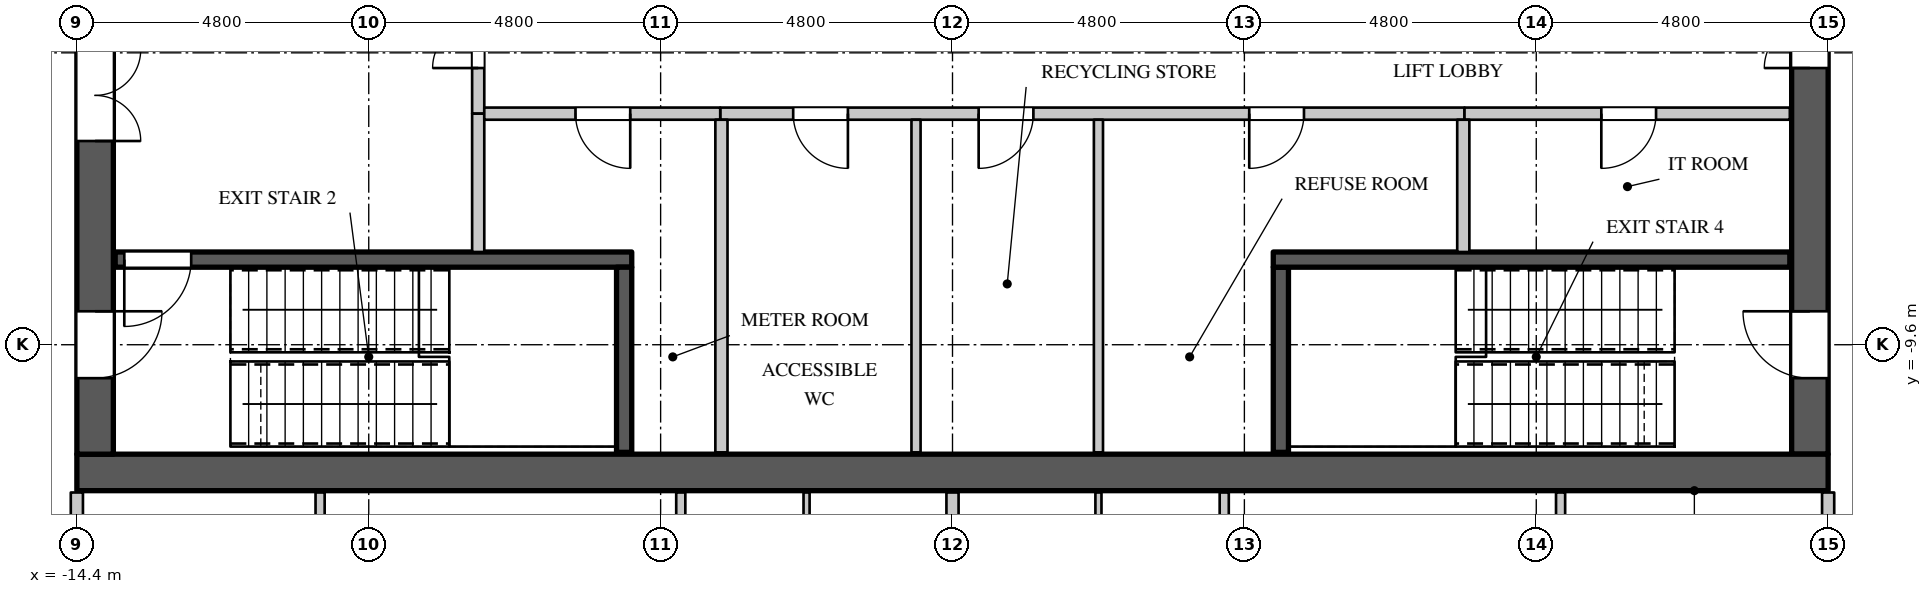
"""IFC4 building model, lengths in metres.
Left out: names, types, materials, properties, quantities, classifications, styles, units other than length and angle.
Written with IfcOpenShell. Run it as: python <this file> out.ifc"""

import sys

from ifc_helpers import new_model, si_unit, direction, frame, frame_2d, origin, place, context, subcontext, project, spatial, rectangle, extrude, element, fill, save


model = new_model("IFC4")
c1 = context("Model", 3, precision=1e-05, world=origin(), true_north=direction((0.0, 1.0)))
c2 = subcontext(c1, "Body", "Model", "MODEL_VIEW")
j1 = project(units=[si_unit("LENGTHUNIT", "METRE"), si_unit("PLANEANGLEUNIT", "RADIAN")], contexts=[c1])
p1 = place(None, origin())
s1 = spatial("IfcSite", under=j1, at=p1, CompositionType="ELEMENT")
p2 = place(p1, origin())
s2 = spatial("IfcBuilding", under=s1, at=p2, CompositionType="ELEMENT")
p3 = place(p2, frame((0.0, 0.0, 310.5)))
s3 = spatial("IfcBuildingStorey", under=s2, at=p3, CompositionType="ELEMENT", Elevation=310.5)
p4 = place(p3, frame((-14.4, -11.7, 0.0), z_axis=(0.0, 0.0, 1.0), x_axis=(1.0, 0.0, 0.0)))
e1 = element("IfcWall", 1, at=p4, inside=s3, PredefinedType="SHEAR", context=c2, shape_type="SweptSolid", body=[
    extrude(rectangle(XDim=28.8, YDim=0.6, at=frame_2d((14.4, 0.0))), origin(), (0.0, 0.0, 1.0), 4.2),
])
p5 = place(p3, frame((14.1, -11.4, 0.0), z_axis=(0.0, 0.0, 1.0), x_axis=(0.0, 1.0, 0.0)))
e2 = element("IfcWall", 2, at=p5, inside=s3, PredefinedType="SHEAR", context=c2, shape_type="SweptSolid", body=[
    extrude(rectangle(XDim=22.8, YDim=0.6, at=frame_2d((11.4, 0.0))), origin(), (0.0, 0.0, 1.0), 4.2),
])
p6 = place(p5, frame((20.45, 0.0, 0.0)))
e3 = element("IfcOpeningElement", 3, at=p6, cuts=e2, PredefinedType="OPENING", context=c2, shape_type="SweptSolid", body=[
    extrude(rectangle(XDim=1.1, YDim=2.2, at=frame_2d((0.55, 1.1))), frame((0.0, 0.31, 0.0), z_axis=(0.0, -1.0, 0.0), x_axis=(1.0, 0.0, 0.0)), (0.0, 0.0, 1.0), 0.62),
])
p7 = place(p5, frame((1.25, 0.0, 0.0)))
e4 = element("IfcOpeningElement", 4, at=p7, cuts=e2, PredefinedType="OPENING", context=c2, shape_type="SweptSolid", body=[
    extrude(rectangle(XDim=1.1, YDim=2.2, at=frame_2d((0.55, 1.1))), frame((0.0, 0.31, 0.0), z_axis=(0.0, -1.0, 0.0), x_axis=(1.0, 0.0, 0.0)), (0.0, 0.0, 1.0), 0.62),
])
p8 = place(p5, frame((14.95, 0.0, 0.0)))
e5 = element("IfcOpeningElement", 5, at=p8, cuts=e2, PredefinedType="OPENING", context=c2, shape_type="SweptSolid", body=[
    extrude(rectangle(XDim=1.5, YDim=2.4, at=frame_2d((0.75, 1.2))), frame((0.0, 0.31, 0.0), z_axis=(0.0, -1.0, 0.0), x_axis=(1.0, 0.0, 0.0)), (0.0, 0.0, 1.0), 0.62),
])
p9 = place(p5, frame((6.35, 0.0, 0.0)))
e6 = element("IfcOpeningElement", 6, at=p9, cuts=e2, PredefinedType="OPENING", context=c2, shape_type="SweptSolid", body=[
    extrude(rectangle(XDim=1.5, YDim=2.4, at=frame_2d((0.75, 1.2))), frame((0.0, 0.31, 0.0), z_axis=(0.0, -1.0, 0.0), x_axis=(1.0, 0.0, 0.0)), (0.0, 0.0, 1.0), 0.62),
])
p10 = place(p3, frame((-14.1, -11.4, 0.0), z_axis=(0.0, 0.0, 1.0), x_axis=(0.0, 1.0, 0.0)))
e7 = element("IfcWall", 7, at=p10, inside=s3, PredefinedType="SHEAR", context=c2, shape_type="SweptSolid", body=[
    extrude(rectangle(XDim=22.8, YDim=0.6, at=frame_2d((11.4, 0.0))), origin(), (0.0, 0.0, 1.0), 4.2),
])
p11 = place(p10, frame((20.45, 0.0, 0.0)))
e8 = element("IfcOpeningElement", 8, at=p11, cuts=e7, PredefinedType="OPENING", context=c2, shape_type="SweptSolid", body=[
    extrude(rectangle(XDim=1.1, YDim=2.2, at=frame_2d((0.55, 1.1))), frame((0.0, 0.31, 0.0), z_axis=(0.0, -1.0, 0.0), x_axis=(1.0, 0.0, 0.0)), (0.0, 0.0, 1.0), 0.62),
])
p12 = place(p10, frame((1.25, 0.0, 0.0)))
e9 = element("IfcOpeningElement", 9, at=p12, cuts=e7, PredefinedType="OPENING", context=c2, shape_type="SweptSolid", body=[
    extrude(rectangle(XDim=1.1, YDim=2.2, at=frame_2d((0.55, 1.1))), frame((0.0, 0.31, 0.0), z_axis=(0.0, -1.0, 0.0), x_axis=(1.0, 0.0, 0.0)), (0.0, 0.0, 1.0), 0.62),
])
p13 = place(p10, frame((16.15, 0.0, 0.0)))
e10 = element("IfcOpeningElement", 10, at=p13, cuts=e7, PredefinedType="OPENING", context=c2, shape_type="SweptSolid", body=[
    extrude(rectangle(XDim=1.5, YDim=2.4, at=frame_2d((0.75, 1.2))), frame((0.0, 0.31, 0.0), z_axis=(0.0, -1.0, 0.0), x_axis=(1.0, 0.0, 0.0)), (0.0, 0.0, 1.0), 0.62),
])
p14 = place(p10, frame((5.15, 0.0, 0.0)))
e11 = element("IfcOpeningElement", 11, at=p14, cuts=e7, PredefinedType="OPENING", context=c2, shape_type="SweptSolid", body=[
    extrude(rectangle(XDim=1.5, YDim=2.4, at=frame_2d((0.75, 1.2))), frame((0.0, 0.31, 0.0), z_axis=(0.0, -1.0, 0.0), x_axis=(1.0, 0.0, 0.0)), (0.0, 0.0, 1.0), 0.62),
])
p15 = place(p3, frame((-14.4, -14.3, 0.0), z_axis=(0.0, 0.0, 1.0), x_axis=(0.0, 1.0, 0.0)))
e12 = element("IfcWall", 12, at=p15, inside=s3, PredefinedType="PARTITIONING", context=c2, shape_type="SweptSolid", body=[
    extrude(rectangle(XDim=2.27, YDim=0.2, at=frame_2d((1.135, 0.0))), origin(), (0.0, 0.0, 1.0), 3.9),
])
p16 = place(p3, frame((-7.8, -5.8, 0.0), z_axis=(0.0, 0.0, 1.0), x_axis=(0.0, 1.0, 0.0)))
e13 = element("IfcWall", 13, at=p16, inside=s3, PredefinedType="PARTITIONING", context=c2, shape_type="SweptSolid", body=[
    extrude(rectangle(XDim=3.0, YDim=0.2, at=frame_2d((1.5, 0.0))), origin(), (0.0, 0.0, 1.0), 3.9),
])
p17 = place(p16, frame((0.75, 0.0, 0.0)))
e14 = element("IfcOpeningElement", 14, at=p17, cuts=e13, PredefinedType="OPENING", context=c2, shape_type="SweptSolid", body=[
    extrude(rectangle(XDim=1.5, YDim=2.4, at=frame_2d((0.75, 1.2))), frame((0.0, 0.11, 0.0), z_axis=(0.0, -1.0, 0.0), x_axis=(1.0, 0.0, 0.0)), (0.0, 0.0, 1.0), 0.22),
])
p18 = place(p3, frame((-3.82, -5.8, 0.0), z_axis=(0.0, 0.0, 1.0), x_axis=(1.0, 0.0, 0.0)))
e15 = element("IfcWall", 15, at=p18, inside=s3, PredefinedType="PARTITIONING", context=c2, shape_type="SweptSolid", body=[
    extrude(rectangle(XDim=12.24, YDim=0.2, at=frame_2d((6.12, 0.0))), origin(), (0.0, 0.0, 1.0), 3.9),
])
p19 = place(p18, frame((1.2, 0.0, 0.0)))
e16 = element("IfcOpeningElement", 16, at=p19, cuts=e15, PredefinedType="OPENING", context=c2, shape_type="SweptSolid", body=[
    extrude(rectangle(XDim=0.9, YDim=2.2, at=frame_2d((0.45, 1.1))), frame((0.0, 0.11, 0.0), z_axis=(0.0, -1.0, 0.0), x_axis=(1.0, 0.0, 0.0)), (0.0, 0.0, 1.0), 0.22),
])
p20 = place(p18, frame((4.25, 0.0, 0.0)))
e17 = element("IfcOpeningElement", 17, at=p20, cuts=e15, PredefinedType="OPENING", context=c2, shape_type="SweptSolid", body=[
    extrude(rectangle(XDim=0.9, YDim=2.2, at=frame_2d((0.45, 1.1))), frame((0.0, 0.11, 0.0), z_axis=(0.0, -1.0, 0.0), x_axis=(1.0, 0.0, 0.0)), (0.0, 0.0, 1.0), 0.22),
])
p21 = place(p18, frame((8.7, 0.0, 0.0)))
e18 = element("IfcOpeningElement", 18, at=p21, cuts=e15, PredefinedType="OPENING", context=c2, shape_type="SweptSolid", body=[
    extrude(rectangle(XDim=0.9, YDim=2.2, at=frame_2d((0.45, 1.1))), frame((0.0, 0.11, 0.0), z_axis=(0.0, -1.0, 0.0), x_axis=(1.0, 0.0, 0.0)), (0.0, 0.0, 1.0), 0.22),
])
p22 = place(p3, frame((14.4, -14.3, 0.0), z_axis=(0.0, 0.0, 1.0), x_axis=(0.0, 1.0, 0.0)))
e19 = element("IfcWall", 19, at=p22, inside=s3, PredefinedType="PARTITIONING", context=c2, shape_type="SweptSolid", body=[
    extrude(rectangle(XDim=2.27, YDim=0.2, at=frame_2d((1.135, 0.0))), origin(), (0.0, 0.0, 1.0), 3.9),
])
p23 = place(p3, frame((-10.4, -18.225, 0.0), z_axis=(0.0, 0.0, 1.0), x_axis=(0.0, 1.0, 0.0)))
e20 = element("IfcWall", 20, at=p23, inside=s3, PredefinedType="PARTITIONING", context=c2, shape_type="SweptSolid", body=[
    extrude(rectangle(XDim=6.195, YDim=0.15, at=frame_2d((3.098, 0.0))), origin(), (0.0, 0.0, 1.0), 3.9),
])
p24 = place(p3, frame((-4.469, -25.95, 0.0), z_axis=(0.0, 0.0, 1.0), x_axis=(0.0, 1.0, 0.0)))
e21 = element("IfcWall", 21, at=p24, inside=s3, PredefinedType="PARTITIONING", context=c2, shape_type="SweptSolid", body=[
    extrude(rectangle(XDim=13.92, YDim=0.15, at=frame_2d((6.96, 0.0))), origin(), (0.0, 0.0, 1.0), 3.3),
])
p25 = place(p24, frame((2.95, 0.0, 0.0)))
e22 = element("IfcOpeningElement", 22, at=p25, cuts=e21, PredefinedType="OPENING", context=c2, shape_type="SweptSolid", body=[
    extrude(rectangle(XDim=0.95, YDim=2.2, at=frame_2d((0.475, 1.1))), frame((0.0, 0.085, 0.0), z_axis=(0.0, -1.0, 0.0), x_axis=(1.0, 0.0, 0.0)), (0.0, 0.0, 1.0), 0.17),
])
for number, where, z_axis, x_axis in (
    (23, (-0.6, -11.37, 0.0), (0.0, 0.0, 1.0), (0.0, 1.0, 0.0)),
    (24, (2.4, -11.37, 0.0), (0.0, 0.0, 1.0), (0.0, 1.0, 0.0)),
):
    element("IfcWall", number, at=place(p3, frame(where, z_axis=z_axis, x_axis=x_axis)), inside=s3, PredefinedType="PARTITIONING", context=c2, shape_type="SweptSolid", body=[
        extrude(rectangle(XDim=5.47, YDim=0.15, at=frame_2d((2.735, 0.0))), origin(), (0.0, 0.0, 1.0), 3.9),
    ])
p26 = place(p3, frame((4.469, -25.95, 0.0), z_axis=(0.0, 0.0, 1.0), x_axis=(0.0, 1.0, 0.0)))
e25 = element("IfcWall", 25, at=p26, inside=s3, PredefinedType="PARTITIONING", context=c2, shape_type="SweptSolid", body=[
    extrude(rectangle(XDim=13.92, YDim=0.15, at=frame_2d((6.96, 0.0))), origin(), (0.0, 0.0, 1.0), 3.3),
])
p27 = place(p26, frame((2.7, 0.0, 0.0)))
e26 = element("IfcOpeningElement", 26, at=p27, cuts=e25, PredefinedType="OPENING", context=c2, shape_type="SweptSolid", body=[
    extrude(rectangle(XDim=0.95, YDim=2.2, at=frame_2d((0.475, 1.1))), frame((0.0, 0.085, 0.0), z_axis=(0.0, -1.0, 0.0), x_axis=(1.0, 0.0, 0.0)), (0.0, 0.0, 1.0), 0.17),
])
p28 = place(p3, frame((10.0, -18.675, 0.0), z_axis=(0.0, 0.0, 1.0), x_axis=(0.0, 1.0, 0.0)))
e27 = element("IfcWall", 27, at=p28, inside=s3, PredefinedType="PARTITIONING", context=c2, shape_type="SweptSolid", body=[
    extrude(rectangle(XDim=6.645, YDim=0.15, at=frame_2d((3.323, 0.0))), origin(), (0.0, 0.0, 1.0), 3.9),
])
p29 = place(p28, frame((2.85, 0.0, 0.0)))
e28 = element("IfcOpeningElement", 28, at=p29, cuts=e27, PredefinedType="OPENING", context=c2, shape_type="SweptSolid", body=[
    extrude(rectangle(XDim=0.95, YDim=2.2, at=frame_2d((0.475, 1.1))), frame((0.0, 0.085, 0.0), z_axis=(0.0, -1.0, 0.0), x_axis=(1.0, 0.0, 0.0)), (0.0, 0.0, 1.0), 0.17),
])
p30 = place(p3, frame((0.0, -26.455, 0.0), z_axis=(0.0, 0.0, 1.0), x_axis=(0.0, 1.0, 0.0)))
e29 = element("IfcWall", 29, at=p30, inside=s3, PredefinedType="PARTITIONING", context=c2, shape_type="SweptSolid", body=[
    extrude(rectangle(XDim=14.425, YDim=0.2, at=frame_2d((7.212, 0.0))), origin(), (0.0, 0.0, 1.0), 3.9),
])
p31 = place(p3, frame((-7.8, -8.075, 0.0), z_axis=(0.0, 0.0, 1.0), x_axis=(0.0, 1.0, 0.0)))
e30 = element("IfcWall", 30, at=p31, inside=s3, PredefinedType="PARTITIONING", context=c2, shape_type="SweptSolid", body=[
    extrude(rectangle(XDim=2.275, YDim=0.2, at=frame_2d((1.137, 0.0))), origin(), (0.0, 0.0, 1.0), 3.9),
])
p32 = place(p3, frame((-7.7, -5.8, 0.0), z_axis=(0.0, 0.0, 1.0), x_axis=(1.0, 0.0, 0.0)))
e31 = element("IfcWall", 31, at=p32, inside=s3, PredefinedType="PARTITIONING", context=c2, shape_type="SweptSolid", body=[
    extrude(rectangle(XDim=3.88, YDim=0.2, at=frame_2d((1.94, 0.0))), origin(), (0.0, 0.0, 1.0), 3.9),
])
p33 = place(p32, frame((1.5, 0.0, 0.0)))
e32 = element("IfcOpeningElement", 32, at=p33, cuts=e31, PredefinedType="OPENING", context=c2, shape_type="SweptSolid", body=[
    extrude(rectangle(XDim=0.9, YDim=2.2, at=frame_2d((0.45, 1.1))), frame((0.0, 0.11, 0.0), z_axis=(0.0, -1.0, 0.0), x_axis=(1.0, 0.0, 0.0)), (0.0, 0.0, 1.0), 0.22),
])
p34 = place(p3, frame((-3.8, -11.37, 0.0), z_axis=(0.0, 0.0, 1.0), x_axis=(0.0, 1.0, 0.0)))
e33 = element("IfcWall", 33, at=p34, inside=s3, PredefinedType="PARTITIONING", context=c2, shape_type="SweptSolid", body=[
    extrude(rectangle(XDim=5.47, YDim=0.2, at=frame_2d((2.735, 0.0))), origin(), (0.0, 0.0, 1.0), 3.9),
])
p35 = place(p3, frame((8.42, -5.8, 0.0), z_axis=(0.0, 0.0, 1.0), x_axis=(1.0, 0.0, 0.0)))
e34 = element("IfcWall", 34, at=p35, inside=s3, PredefinedType="PARTITIONING", context=c2, shape_type="SweptSolid", body=[
    extrude(rectangle(XDim=5.35, YDim=0.2, at=frame_2d((2.675, 0.0))), origin(), (0.0, 0.0, 1.0), 3.9),
])
p36 = place(p35, frame((2.25, 0.0, 0.0)))
e35 = element("IfcOpeningElement", 35, at=p36, cuts=e34, PredefinedType="OPENING", context=c2, shape_type="SweptSolid", body=[
    extrude(rectangle(XDim=0.9, YDim=2.2, at=frame_2d((0.45, 1.1))), frame((0.0, 0.11, 0.0), z_axis=(0.0, -1.0, 0.0), x_axis=(1.0, 0.0, 0.0)), (0.0, 0.0, 1.0), 0.22),
])
p37 = place(p3, frame((8.4, -8.075, 0.0), z_axis=(0.0, 0.0, 1.0), x_axis=(0.0, 1.0, 0.0)))
e36 = element("IfcWall", 36, at=p37, inside=s3, PredefinedType="PARTITIONING", context=c2, shape_type="SweptSolid", body=[
    extrude(rectangle(XDim=2.175, YDim=0.2, at=frame_2d((1.087, 0.0))), origin(), (0.0, 0.0, 1.0), 3.9),
])
p38 = place(p3, frame((-13.77, -8.2, 0.0), z_axis=(0.0, 0.0, 1.0), x_axis=(1.0, 0.0, 0.0)))
e37 = element("IfcWall", 37, at=p38, inside=s3, PredefinedType="SHEAR", context=c2, shape_type="SweptSolid", body=[
    extrude(rectangle(XDim=8.495, YDim=0.25, at=frame_2d((4.248, 0.0))), origin(), (0.0, 0.0, 1.0), 3.9),
])
p39 = place(p38, frame((0.15, 0.0, 0.0)))
e38 = element("IfcOpeningElement", 38, at=p39, cuts=e37, PredefinedType="OPENING", context=c2, shape_type="SweptSolid", body=[
    extrude(rectangle(XDim=1.1, YDim=2.2, at=frame_2d((0.55, 1.1))), frame((0.0, 0.135, 0.0), z_axis=(0.0, -1.0, 0.0), x_axis=(1.0, 0.0, 0.0)), (0.0, 0.0, 1.0), 0.27),
])
for number, where, z_axis, x_axis in (
    (39, (-5.4, -11.37, 0.0), (0.0, 0.0, 1.0), (0.0, 1.0, 0.0)),
    (40, (5.4, -11.37, 0.0), (0.0, 0.0, 1.0), (0.0, 1.0, 0.0)),
):
    element("IfcWall", number, at=place(p3, frame(where, z_axis=z_axis, x_axis=x_axis)), inside=s3, PredefinedType="SHEAR", context=c2, shape_type="SweptSolid", body=[
        extrude(rectangle(XDim=3.045, YDim=0.25, at=frame_2d((1.522, 0.0))), origin(), (0.0, 0.0, 1.0), 3.9),
    ])
p40 = place(p3, frame((5.275, -8.2, 0.0), z_axis=(0.0, 0.0, 1.0), x_axis=(1.0, 0.0, 0.0)))
e41 = element("IfcWall", 41, at=p40, inside=s3, PredefinedType="SHEAR", context=c2, shape_type="SweptSolid", body=[
    extrude(rectangle(XDim=8.495, YDim=0.25, at=frame_2d((4.248, 0.0))), origin(), (0.0, 0.0, 1.0), 3.9),
])
p41 = place(p3, frame((-2.4, -18.675, 0.0), z_axis=(0.0, 0.0, 1.0), x_axis=(0.0, 1.0, 0.0)))
e42 = element("IfcWall", 42, at=p41, inside=s3, PredefinedType="PARTITIONING", context=c2, shape_type="SweptSolid", body=[
    extrude(rectangle(XDim=6.645, YDim=0.1, at=frame_2d((3.323, 0.0))), origin(), (0.0, 0.0, 1.0), 3.9),
])
p42 = place(p3, frame((2.4, -19.125, 0.0), z_axis=(0.0, 0.0, 1.0), x_axis=(0.0, 1.0, 0.0)))
e43 = element("IfcWall", 43, at=p42, inside=s3, PredefinedType="PARTITIONING", context=c2, shape_type="SweptSolid", body=[
    extrude(rectangle(XDim=7.095, YDim=0.1, at=frame_2d((3.547, 0.0))), origin(), (0.0, 0.0, 1.0), 3.9),
])
p43 = place(p33, origin())
e44 = element("IfcDoor", 44, at=p43, inside=s3, OperationType="SINGLE_SWING_LEFT", PredefinedType="DOOR", context=c2, shape_type="SweptSolid", body=[
    extrude(rectangle(XDim=0.9, YDim=2.2, at=frame_2d((0.45, 1.1))), frame((0.0, 0.025, 0.0), z_axis=(0.0, -1.0, 0.0), x_axis=(1.0, 0.0, 0.0)), (0.0, 0.0, 1.0), 0.05),
])
fill(e32, e44)
p44 = place(p19, origin())
e45 = element("IfcDoor", 45, at=p44, inside=s3, OperationType="SINGLE_SWING_LEFT", PredefinedType="DOOR", context=c2, shape_type="SweptSolid", body=[
    extrude(rectangle(XDim=0.9, YDim=2.2, at=frame_2d((0.45, 1.1))), frame((0.0, 0.025, 0.0), z_axis=(0.0, -1.0, 0.0), x_axis=(1.0, 0.0, 0.0)), (0.0, 0.0, 1.0), 0.05),
])
fill(e16, e45)
p45 = place(p20, origin())
e46 = element("IfcDoor", 46, at=p45, inside=s3, OperationType="SINGLE_SWING_RIGHT", PredefinedType="DOOR", context=c2, shape_type="SweptSolid", body=[
    extrude(rectangle(XDim=0.9, YDim=2.2, at=frame_2d((0.45, 1.1))), frame((0.0, 0.025, 0.0), z_axis=(0.0, -1.0, 0.0), x_axis=(1.0, 0.0, 0.0)), (0.0, 0.0, 1.0), 0.05),
])
fill(e17, e46)
p46 = place(p21, origin())
e47 = element("IfcDoor", 47, at=p46, inside=s3, OperationType="SINGLE_SWING_RIGHT", PredefinedType="DOOR", context=c2, shape_type="SweptSolid", body=[
    extrude(rectangle(XDim=0.9, YDim=2.2, at=frame_2d((0.45, 1.1))), frame((0.0, 0.025, 0.0), z_axis=(0.0, -1.0, 0.0), x_axis=(1.0, 0.0, 0.0)), (0.0, 0.0, 1.0), 0.05),
])
fill(e18, e47)
p47 = place(p36, origin())
e48 = element("IfcDoor", 48, at=p47, inside=s3, OperationType="SINGLE_SWING_RIGHT", PredefinedType="DOOR", context=c2, shape_type="SweptSolid", body=[
    extrude(rectangle(XDim=0.9, YDim=2.2, at=frame_2d((0.45, 1.1))), frame((0.0, 0.025, 0.0), z_axis=(0.0, -1.0, 0.0), x_axis=(1.0, 0.0, 0.0)), (0.0, 0.0, 1.0), 0.05),
])
fill(e35, e48)
p48 = place(p39, origin())
e49 = element("IfcDoor", 49, at=p48, inside=s3, OperationType="SINGLE_SWING_RIGHT", PredefinedType="DOOR", context=c2, shape_type="SweptSolid", body=[
    extrude(rectangle(XDim=1.1, YDim=2.2, at=frame_2d((0.55, 1.1))), frame((0.0, 0.025, 0.0), z_axis=(0.0, -1.0, 0.0), x_axis=(1.0, 0.0, 0.0)), (0.0, 0.0, 1.0), 0.05),
])
fill(e38, e49)
p49 = place(p17, origin())
e50 = element("IfcDoor", 50, at=p49, inside=s3, OperationType="DOUBLE_DOOR_SINGLE_SWING", PredefinedType="DOOR", context=c2, shape_type="SweptSolid", body=[
    extrude(rectangle(XDim=1.5, YDim=2.4, at=frame_2d((0.75, 1.2))), frame((0.0, 0.025, 0.0), z_axis=(0.0, -1.0, 0.0), x_axis=(1.0, 0.0, 0.0)), (0.0, 0.0, 1.0), 0.05),
])
fill(e14, e50)
p50 = place(p12, origin())
e51 = element("IfcDoor", 51, at=p50, inside=s3, OperationType="SINGLE_SWING_LEFT", PredefinedType="DOOR", context=c2, shape_type="SweptSolid", body=[
    extrude(rectangle(XDim=1.1, YDim=2.2, at=frame_2d((0.55, 1.1))), frame((0.0, -0.245, 0.0), z_axis=(0.0, -1.0, 0.0), x_axis=(1.0, 0.0, 0.0)), (0.0, 0.0, 1.0), 0.05),
])
fill(e9, e51)
p51 = place(p7, origin())
e52 = element("IfcDoor", 52, at=p51, inside=s3, OperationType="SINGLE_SWING_RIGHT", PredefinedType="DOOR", context=c2, shape_type="SweptSolid", body=[
    extrude(rectangle(XDim=1.1, YDim=2.2, at=frame_2d((0.55, 1.1))), frame((0.0, 0.295, 0.0), z_axis=(0.0, -1.0, 0.0), x_axis=(1.0, 0.0, 0.0)), (0.0, 0.0, 1.0), 0.05),
])
fill(e4, e52)
p52 = place(p14, origin())
e53 = element("IfcDoor", 53, at=p52, inside=s3, OperationType="DOUBLE_DOOR_SINGLE_SWING", PredefinedType="DOOR", context=c2, shape_type="SweptSolid", body=[
    extrude(rectangle(XDim=1.5, YDim=2.4, at=frame_2d((0.75, 1.2))), frame((0.0, -0.245, 0.0), z_axis=(0.0, -1.0, 0.0), x_axis=(1.0, 0.0, 0.0)), (0.0, 0.0, 1.0), 0.05),
])
fill(e11, e53)
p53 = place(p9, origin())
e54 = element("IfcDoor", 54, at=p53, inside=s3, OperationType="DOUBLE_DOOR_SINGLE_SWING", PredefinedType="DOOR", context=c2, shape_type="SweptSolid", body=[
    extrude(rectangle(XDim=1.5, YDim=2.4, at=frame_2d((0.75, 1.2))), frame((0.0, 0.295, 0.0), z_axis=(0.0, -1.0, 0.0), x_axis=(1.0, 0.0, 0.0)), (0.0, 0.0, 1.0), 0.05),
])
fill(e6, e54)
save(model, sys.argv[1])
